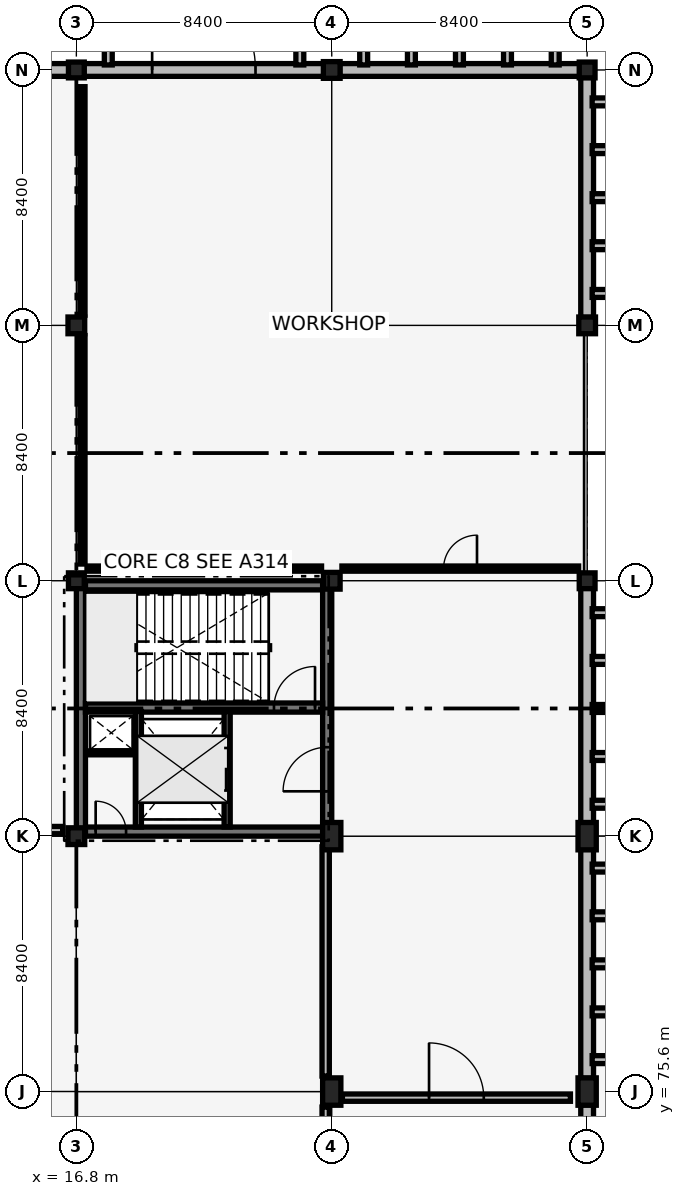
"""IFC4 building model, lengths in metres.
Left out: names, types, materials, properties, quantities, classifications, styles, units other than length and angle.
Written with IfcOpenShell. Run it as: python <this file> out.ifc"""

import sys

from ifc_helpers import new_model, si_unit, direction, frame, frame_2d, origin, origin_2d, place, context, subcontext, project, spatial, rectangle, extrude, element, fill, save


model = new_model("IFC4")
c1 = context("Model", 3, precision=1e-05, world=origin(), true_north=direction((0.0, 1.0)))
c2 = subcontext(c1, "Body", "Model", "MODEL_VIEW")
j1 = project(units=[si_unit("LENGTHUNIT", "METRE"), si_unit("PLANEANGLEUNIT", "RADIAN")], contexts=[c1])
p1 = place(None, origin())
s1 = spatial("IfcSite", under=j1, at=p1, CompositionType="ELEMENT")
p2 = place(p1, origin())
s2 = spatial("IfcBuilding", under=s1, at=p2, CompositionType="ELEMENT")
p3 = place(p2, origin())
s3 = spatial("IfcBuildingStorey", under=s2, at=p3, CompositionType="ELEMENT", Elevation=0.0)
p4 = place(p3, frame((16.95, 84.15, 0.0), z_axis=(0.0, 0.0, 1.0), x_axis=(1.0, 0.0, 0.0)))
e1 = element("IfcWall", 1, at=p4, inside=s3, PredefinedType="SHEAR", context=c2, shape_type="SweptSolid", body=[
    extrude(rectangle(XDim=8.1, YDim=0.3, at=frame_2d((4.05, 0.0))), origin(), (0.0, 0.0, 1.0), 5.14),
])
p5 = place(p4, frame((0.485, 0.0, 0.0)))
e2 = element("IfcOpeningElement", 2, at=p5, cuts=e1, PredefinedType="OPENING", context=c2, shape_type="SweptSolid", body=[
    extrude(rectangle(XDim=1.0, YDim=2.15, at=frame_2d((0.5, 1.075))), frame((0.0, 0.16, 0.0), z_axis=(0.0, -1.0, 0.0), x_axis=(1.0, 0.0, 0.0)), (0.0, 0.0, 1.0), 0.32),
])
for number, where, z_axis, x_axis in (
    (3, (16.95, 92.25, 0.0), (0.0, 0.0, 1.0), (1.0, 0.0, 0.0)),
    (4, (16.95, 84.15, 0.0), (0.0, 0.0, 1.0), (0.0, 1.0, 0.0)),
):
    element("IfcWall", number, at=place(p3, frame(where, z_axis=z_axis, x_axis=x_axis)), inside=s3, PredefinedType="SHEAR", context=c2, shape_type="SweptSolid", body=[
        extrude(rectangle(XDim=8.1, YDim=0.3, at=frame_2d((4.05, 0.0))), origin(), (0.0, 0.0, 1.0), 5.14),
    ])
p6 = place(p3, frame((25.05, 84.15, 0.0), z_axis=(0.0, 0.0, 1.0), x_axis=(0.0, 1.0, 0.0)))
e5 = element("IfcWall", 5, at=p6, inside=s3, PredefinedType="SHEAR", context=c2, shape_type="SweptSolid", body=[
    extrude(rectangle(XDim=8.1, YDim=0.3, at=frame_2d((4.05, 0.0))), origin(), (0.0, 0.0, 1.0), 5.14),
])
p7 = place(p6, frame((1.325, 0.0, 0.0)))
e6 = element("IfcOpeningElement", 6, at=p7, cuts=e5, PredefinedType="OPENING", context=c2, shape_type="SweptSolid", body=[
    extrude(rectangle(XDim=1.45, YDim=2.15, at=frame_2d((0.725, 1.075))), frame((0.0, 0.16, 0.0), z_axis=(0.0, -1.0, 0.0), x_axis=(1.0, 0.0, 0.0)), (0.0, 0.0, 1.0), 0.32),
])
p8 = place(p3, frame((17.1, 88.23, 0.0), z_axis=(0.0, 0.0, 1.0), x_axis=(1.0, 0.0, 0.0)))
e7 = element("IfcWall", 7, at=p8, inside=s3, PredefinedType="SHEAR", context=c2, shape_type="SweptSolid", body=[
    extrude(rectangle(XDim=7.8, YDim=0.3, at=frame_2d((3.9, 0.0))), origin(), (0.0, 0.0, 1.0), 5.14),
])
p9 = place(p8, frame((6.2, 0.0, 0.0)))
e8 = element("IfcOpeningElement", 8, at=p9, cuts=e7, PredefinedType="OPENING", context=c2, shape_type="SweptSolid", body=[
    extrude(rectangle(XDim=1.35, YDim=2.15, at=frame_2d((0.675, 1.075))), frame((0.0, 0.16, 0.0), z_axis=(0.0, -1.0, 0.0), x_axis=(1.0, 0.0, 0.0)), (0.0, 0.0, 1.0), 0.32),
])
p10 = place(p3, frame((16.8, 84.0, 0.0), z_axis=(0.0, 0.0, 1.0), x_axis=(1.0, 0.0, 0.0)))
e9 = element("IfcColumn", 9, at=p10, inside=s3, PredefinedType="COLUMN", context=c2, shape_type="SweptSolid", body=[
    extrude(rectangle(XDim=0.55, YDim=0.55, at=origin_2d()), origin(), (0.0, 0.0, 1.0), 5.14),
])
p11 = place(p3, frame((16.8, 92.4, 0.0), z_axis=(0.0, 0.0, 1.0), x_axis=(1.0, 0.0, 0.0)))
e10 = element("IfcColumn", 10, at=p11, inside=s3, PredefinedType="COLUMN", context=c2, shape_type="SweptSolid", body=[
    extrude(rectangle(XDim=0.52, YDim=0.52, at=origin_2d()), origin(), (0.0, 0.0, 1.0), 5.14),
])
p12 = place(p3, frame((16.8, 100.8, 0.0), z_axis=(0.0, 0.0, 1.0), x_axis=(1.0, 0.0, 0.0)))
e11 = element("IfcColumn", 11, at=p12, inside=s3, PredefinedType="COLUMN", context=c2, shape_type="SweptSolid", body=[
    extrude(rectangle(XDim=0.55, YDim=0.55, at=origin_2d()), origin(), (0.0, 0.0, 1.0), 5.14),
])
p13 = place(p3, frame((16.8, 109.2, 0.0), z_axis=(0.0, 0.0, 1.0), x_axis=(1.0, 0.0, 0.0)))
e12 = element("IfcColumn", 12, at=p13, inside=s3, PredefinedType="COLUMN", context=c2, shape_type="SweptSolid", body=[
    extrude(rectangle(XDim=0.52, YDim=0.52, at=origin_2d()), origin(), (0.0, 0.0, 1.0), 5.14),
])
for number, where, z_axis, x_axis in (
    (13, (25.2, 75.6, 0.0), (0.0, 0.0, 1.0), (1.0, 0.0, 0.0)),
    (14, (25.2, 84.0, 0.0), (0.0, 0.0, 1.0), (1.0, 0.0, 0.0)),
):
    element("IfcColumn", number, at=place(p3, frame(where, z_axis=z_axis, x_axis=x_axis)), inside=s3, PredefinedType="COLUMN", context=c2, shape_type="SweptSolid", body=[
        extrude(rectangle(XDim=0.6, YDim=0.9, at=origin_2d()), origin(), (0.0, 0.0, 1.0), 5.14),
    ])
p14 = place(p3, frame((25.2, 92.4, 0.0), z_axis=(0.0, 0.0, 1.0), x_axis=(1.0, 0.0, 0.0)))
e15 = element("IfcColumn", 15, at=p14, inside=s3, PredefinedType="COLUMN", context=c2, shape_type="SweptSolid", body=[
    extrude(rectangle(XDim=0.55, YDim=0.55, at=origin_2d()), origin(), (0.0, 0.0, 1.0), 5.14),
])
p15 = place(p3, frame((25.2, 100.8, 0.0), z_axis=(0.0, 0.0, 1.0), x_axis=(1.0, 0.0, 0.0)))
e16 = element("IfcColumn", 16, at=p15, inside=s3, PredefinedType="COLUMN", context=c2, shape_type="SweptSolid", body=[
    extrude(rectangle(XDim=0.5, YDim=0.5, at=origin_2d()), origin(), (0.0, 0.0, 1.0), 5.14),
])
p16 = place(p3, frame((25.2, 109.2, 0.0), z_axis=(0.0, 0.0, 1.0), x_axis=(1.0, 0.0, 0.0)))
e17 = element("IfcColumn", 17, at=p16, inside=s3, PredefinedType="COLUMN", context=c2, shape_type="SweptSolid", body=[
    extrude(rectangle(XDim=0.55, YDim=0.55, at=origin_2d()), origin(), (0.0, 0.0, 1.0), 5.14),
])
for number, where, z_axis, x_axis in (
    (18, (33.6, 75.6, 0.0), (0.0, 0.0, 1.0), (1.0, 0.0, 0.0)),
    (19, (33.6, 84.0, 0.0), (0.0, 0.0, 1.0), (1.0, 0.0, 0.0)),
):
    element("IfcColumn", number, at=place(p3, frame(where, z_axis=z_axis, x_axis=x_axis)), inside=s3, PredefinedType="COLUMN", context=c2, shape_type="SweptSolid", body=[
        extrude(rectangle(XDim=0.6, YDim=0.9, at=origin_2d()), origin(), (0.0, 0.0, 1.0), 5.14),
    ])
p17 = place(p3, frame((33.6, 92.4, 0.0), z_axis=(0.0, 0.0, 1.0), x_axis=(1.0, 0.0, 0.0)))
e20 = element("IfcColumn", 20, at=p17, inside=s3, PredefinedType="COLUMN", context=c2, shape_type="SweptSolid", body=[
    extrude(rectangle(XDim=0.52, YDim=0.52, at=origin_2d()), origin(), (0.0, 0.0, 1.0), 5.14),
])
p18 = place(p3, frame((33.6, 100.8, 0.0), z_axis=(0.0, 0.0, 1.0), x_axis=(1.0, 0.0, 0.0)))
e21 = element("IfcColumn", 21, at=p18, inside=s3, PredefinedType="COLUMN", context=c2, shape_type="SweptSolid", body=[
    extrude(rectangle(XDim=0.55, YDim=0.55, at=origin_2d()), origin(), (0.0, 0.0, 1.0), 5.14),
])
p19 = place(p3, frame((33.6, 109.2, 0.0), z_axis=(0.0, 0.0, 1.0), x_axis=(1.0, 0.0, 0.0)))
e22 = element("IfcColumn", 22, at=p19, inside=s3, PredefinedType="COLUMN", context=c2, shape_type="SweptSolid", body=[
    extrude(rectangle(XDim=0.52, YDim=0.52, at=origin_2d()), origin(), (0.0, 0.0, 1.0), 5.14),
])
p20 = place(p3, frame((8.66, 109.2, 0.0), z_axis=(0.0, 0.0, 1.0), x_axis=(1.0, 0.0, 0.0)))
e23 = element("IfcWall", 23, at=p20, inside=s3, PredefinedType="SOLIDWALL", context=c2, shape_type="SweptSolid", body=[
    extrude(rectangle(XDim=7.895, YDim=0.42, at=frame_2d((3.948, 0.0))), origin(), (0.0, 0.0, 1.0), 4.35),
])
p21 = place(p20, frame((2.248, 0.0, 0.0)))
e24 = element("IfcOpeningElement", 24, at=p21, cuts=e23, PredefinedType="OPENING", context=c2, shape_type="SweptSolid", body=[
    extrude(rectangle(XDim=3.4, YDim=3.8, at=frame_2d((1.7, 1.9))), frame((0.0, 0.22, 0.0), z_axis=(0.0, -1.0, 0.0), x_axis=(1.0, 0.0, 0.0)), (0.0, 0.0, 1.0), 0.44),
])
p22 = place(p3, frame((17.045, 109.2, 0.0), z_axis=(0.0, 0.0, 1.0), x_axis=(1.0, 0.0, 0.0)))
e25 = element("IfcWall", 25, at=p22, inside=s3, PredefinedType="SOLIDWALL", context=c2, shape_type="SweptSolid", body=[
    extrude(rectangle(XDim=7.895, YDim=0.42, at=frame_2d((3.948, 0.0))), origin(), (0.0, 0.0, 1.0), 4.35),
])
p23 = place(p22, frame((2.248, 0.0, 0.0)))
e26 = element("IfcOpeningElement", 26, at=p23, cuts=e25, PredefinedType="OPENING", context=c2, shape_type="SweptSolid", body=[
    extrude(rectangle(XDim=3.4, YDim=3.8, at=frame_2d((1.7, 1.9))), frame((0.0, 0.22, 0.0), z_axis=(0.0, -1.0, 0.0), x_axis=(1.0, 0.0, 0.0)), (0.0, 0.0, 1.0), 0.44),
])
for number, where, z_axis, x_axis in (
    (27, (17.85, 109.365, -0.25), (0.0, 0.0, 1.0), (0.0, 1.0, 0.0)),
    (28, (24.15, 109.365, -0.25), (0.0, 0.0, 1.0), (0.0, 1.0, 0.0)),
):
    element("IfcWall", number, at=place(p3, frame(where, z_axis=z_axis, x_axis=x_axis)), inside=s3, PredefinedType="SOLIDWALL", context=c2, shape_type="SweptSolid", body=[
        extrude(rectangle(XDim=0.7, YDim=0.26, at=frame_2d((0.35, 0.0))), origin(), (0.0, 0.0, 1.0), 5.69),
    ])
p24 = place(p3, frame((33.6, 67.635, 0.0), z_axis=(0.0, 0.0, 1.0), x_axis=(0.0, 1.0, 0.0)))
e29 = element("IfcWall", 29, at=p24, inside=s3, PredefinedType="SOLIDWALL", context=c2, shape_type="SweptSolid", body=[
    extrude(rectangle(XDim=7.53, YDim=0.42, at=frame_2d((3.765, 0.0))), origin(), (0.0, 0.0, 1.0), 4.35),
])
p25 = place(p24, frame((2.665, 0.0, 0.0)))
e30 = element("IfcOpeningElement", 30, at=p25, cuts=e29, PredefinedType="OPENING", context=c2, shape_type="SweptSolid", body=[
    extrude(rectangle(XDim=2.2, YDim=2.4, at=frame_2d((1.1, 1.2))), frame((0.0, 0.22, 0.0), z_axis=(0.0, -1.0, 0.0), x_axis=(1.0, 0.0, 0.0)), (0.0, 0.0, 1.0), 0.44),
])
p26 = place(p3, frame((33.6, 76.035, 0.0), z_axis=(0.0, 0.0, 1.0), x_axis=(0.0, 1.0, 0.0)))
e31 = element("IfcWall", 31, at=p26, inside=s3, PredefinedType="SOLIDWALL", context=c2, shape_type="SweptSolid", body=[
    extrude(rectangle(XDim=7.53, YDim=0.42, at=frame_2d((3.765, 0.0))), origin(), (0.0, 0.0, 1.0), 4.35),
])
for number, where, z_axis, x_axis in (
    (32, (33.765, 76.65, -0.25), (0.0, 0.0, 1.0), (1.0, 0.0, 0.0)),
    (33, (33.765, 78.22, -0.25), (0.0, 0.0, 1.0), (1.0, 0.0, 0.0)),
    (34, (33.765, 79.8, -0.25), (0.0, 0.0, 1.0), (1.0, 0.0, 0.0)),
    (35, (33.765, 81.38, -0.25), (0.0, 0.0, 1.0), (1.0, 0.0, 0.0)),
    (36, (33.765, 82.95, -0.25), (0.0, 0.0, 1.0), (1.0, 0.0, 0.0)),
):
    element("IfcWall", number, at=place(p3, frame(where, z_axis=z_axis, x_axis=x_axis)), inside=s3, PredefinedType="SOLIDWALL", context=c2, shape_type="SweptSolid", body=[
        extrude(rectangle(XDim=0.7, YDim=0.26, at=frame_2d((0.35, 0.0))), origin(), (0.0, 0.0, 1.0), 5.69),
    ])
p27 = place(p3, frame((33.6, 84.435, 0.0), z_axis=(0.0, 0.0, 1.0), x_axis=(0.0, 1.0, 0.0)))
e37 = element("IfcWall", 37, at=p27, inside=s3, PredefinedType="SOLIDWALL", context=c2, shape_type="SweptSolid", body=[
    extrude(rectangle(XDim=7.72, YDim=0.42, at=frame_2d((3.86, 0.0))), origin(), (0.0, 0.0, 1.0), 4.35),
])
for number, where, z_axis, x_axis in (
    (38, (33.765, 85.05, -0.25), (0.0, 0.0, 1.0), (1.0, 0.0, 0.0)),
    (39, (33.765, 86.62, -0.25), (0.0, 0.0, 1.0), (1.0, 0.0, 0.0)),
    (40, (33.765, 88.2, -0.25), (0.0, 0.0, 1.0), (1.0, 0.0, 0.0)),
    (41, (33.765, 89.78, -0.25), (0.0, 0.0, 1.0), (1.0, 0.0, 0.0)),
    (42, (33.765, 91.35, -0.25), (0.0, 0.0, 1.0), (1.0, 0.0, 0.0)),
):
    element("IfcWall", number, at=place(p3, frame(where, z_axis=z_axis, x_axis=x_axis)), inside=s3, PredefinedType="SOLIDWALL", context=c2, shape_type="SweptSolid", body=[
        extrude(rectangle(XDim=0.7, YDim=0.26, at=frame_2d((0.35, 0.0))), origin(), (0.0, 0.0, 1.0), 5.69),
    ])
p28 = place(p3, frame((25.46, 109.2, 0.0), z_axis=(0.0, 0.0, 1.0), x_axis=(1.0, 0.0, 0.0)))
e43 = element("IfcWall", 43, at=p28, inside=s3, PredefinedType="SOLIDWALL", context=c2, shape_type="SweptSolid", body=[
    extrude(rectangle(XDim=7.895, YDim=0.42, at=frame_2d((3.948, 0.0))), origin(), (0.0, 0.0, 1.0), 4.35),
])
for number, where, z_axis, x_axis in (
    (44, (26.25, 109.365, -0.25), (0.0, 0.0, 1.0), (0.0, 1.0, 0.0)),
    (45, (27.82, 109.365, -0.25), (0.0, 0.0, 1.0), (0.0, 1.0, 0.0)),
    (46, (29.4, 109.365, -0.25), (0.0, 0.0, 1.0), (0.0, 1.0, 0.0)),
    (47, (30.98, 109.365, -0.25), (0.0, 0.0, 1.0), (0.0, 1.0, 0.0)),
    (48, (32.55, 109.365, -0.25), (0.0, 0.0, 1.0), (0.0, 1.0, 0.0)),
):
    element("IfcWall", number, at=place(p3, frame(where, z_axis=z_axis, x_axis=x_axis)), inside=s3, PredefinedType="SOLIDWALL", context=c2, shape_type="SweptSolid", body=[
        extrude(rectangle(XDim=0.7, YDim=0.26, at=frame_2d((0.35, 0.0))), origin(), (0.0, 0.0, 1.0), 5.69),
    ])
p29 = place(p3, frame((33.6, 101.06, 0.0), z_axis=(0.0, 0.0, 1.0), x_axis=(0.0, 1.0, 0.0)))
e49 = element("IfcWall", 49, at=p29, inside=s3, PredefinedType="SOLIDWALL", context=c2, shape_type="SweptSolid", body=[
    extrude(rectangle(XDim=7.895, YDim=0.42, at=frame_2d((3.948, 0.0))), origin(), (0.0, 0.0, 1.0), 4.35),
])
for number, where, z_axis, x_axis in (
    (50, (33.765, 101.85, -0.25), (0.0, 0.0, 1.0), (1.0, 0.0, 0.0)),
    (51, (33.765, 103.42, -0.25), (0.0, 0.0, 1.0), (1.0, 0.0, 0.0)),
    (52, (33.765, 105.0, -0.25), (0.0, 0.0, 1.0), (1.0, 0.0, 0.0)),
    (53, (33.765, 106.58, -0.25), (0.0, 0.0, 1.0), (1.0, 0.0, 0.0)),
    (54, (33.765, 108.15, -0.25), (0.0, 0.0, 1.0), (1.0, 0.0, 0.0)),
):
    element("IfcWall", number, at=place(p3, frame(where, z_axis=z_axis, x_axis=x_axis)), inside=s3, PredefinedType="SOLIDWALL", context=c2, shape_type="SweptSolid", body=[
        extrude(rectangle(XDim=0.7, YDim=0.26, at=frame_2d((0.35, 0.0))), origin(), (0.0, 0.0, 1.0), 5.69),
    ])
p30 = place(p3, frame((21.76, 84.3, 0.0), z_axis=(0.0, 0.0, 1.0), x_axis=(0.0, 1.0, 0.0)))
e55 = element("IfcWall", 55, at=p30, inside=s3, PredefinedType="SHEAR", context=c2, shape_type="SweptSolid", body=[
    extrude(rectangle(XDim=3.8, YDim=0.2, at=frame_2d((1.9, 0.0))), origin(), (0.0, 0.0, 1.0), 4.36),
])
p31 = place(p30, frame((1.2, 0.0, 0.0)))
e56 = element("IfcOpeningElement", 56, at=p31, cuts=e55, PredefinedType="OPENING", context=c2, shape_type="SweptSolid", body=[
    extrude(rectangle(XDim=1.4, YDim=2.2, at=frame_2d((0.7, 1.1))), frame((0.0, 0.11, 0.0), z_axis=(0.0, -1.0, 0.0), x_axis=(1.0, 0.0, 0.0)), (0.0, 0.0, 1.0), 0.22),
])
p32 = place(p3, frame((18.84, 84.3, 0.0), z_axis=(0.0, 0.0, 1.0), x_axis=(0.0, 1.0, 0.0)))
e57 = element("IfcWall", 57, at=p32, inside=s3, PredefinedType="SHEAR", context=c2, shape_type="SweptSolid", body=[
    extrude(rectangle(XDim=3.8, YDim=0.2, at=frame_2d((1.9, 0.0))), origin(), (0.0, 0.0, 1.0), 4.36),
])
p33 = place(p3, frame((17.12, 86.74, 0.0), z_axis=(0.0, 0.0, 1.0), x_axis=(1.0, 0.0, 0.0)))
e58 = element("IfcWall", 58, at=p33, inside=s3, PredefinedType="PARTITIONING", context=c2, shape_type="SweptSolid", body=[
    extrude(rectangle(XDim=1.62, YDim=0.13, at=frame_2d((0.81, 0.0))), origin(), (0.0, 0.0, 1.0), 5.14),
])
p34 = place(p3, frame((25.0, 67.71, 0.0), z_axis=(0.0, 0.0, 1.0), x_axis=(0.0, 1.0, 0.0)))
e59 = element("IfcWall", 59, at=p34, inside=s3, PredefinedType="PARTITIONING", context=c2, shape_type="SweptSolid", body=[
    extrude(rectangle(XDim=7.38, YDim=0.24, at=frame_2d((3.69, 0.0))), origin(), (0.0, 0.0, 1.0), 4.35),
])
p35 = place(p3, frame((25.0, 76.11, 0.0), z_axis=(0.0, 0.0, 1.0), x_axis=(0.0, 1.0, 0.0)))
e60 = element("IfcWall", 60, at=p35, inside=s3, PredefinedType="PARTITIONING", context=c2, shape_type="SweptSolid", body=[
    extrude(rectangle(XDim=7.54, YDim=0.24, at=frame_2d((3.77, 0.0))), origin(), (0.0, 0.0, 1.0), 4.35),
])
p36 = place(p3, frame((25.55, 75.4, 0.0), z_axis=(0.0, 0.0, 1.0), x_axis=(1.0, 0.0, 0.0)))
e61 = element("IfcWall", 61, at=p36, inside=s3, PredefinedType="PARTITIONING", context=c2, shape_type="SweptSolid", body=[
    extrude(rectangle(XDim=7.5, YDim=0.24, at=frame_2d((3.75, 0.0))), origin(), (0.0, 0.0, 1.0), 4.42),
])
p37 = place(p36, frame((2.85, 0.0, 0.0)))
e62 = element("IfcOpeningElement", 62, at=p37, cuts=e61, PredefinedType="OPENING", context=c2, shape_type="SweptSolid", body=[
    extrude(rectangle(XDim=1.8, YDim=2.4, at=frame_2d((0.9, 1.2))), frame((0.0, 0.13, 0.0), z_axis=(0.0, -1.0, 0.0), x_axis=(1.0, 0.0, 0.0)), (0.0, 0.0, 1.0), 0.26),
])
p38 = place(p3, frame((8.71, 84.2, 0.0), z_axis=(0.0, 0.0, 1.0), x_axis=(1.0, 0.0, 0.0)))
e63 = element("IfcWall", 63, at=p38, inside=s3, PredefinedType="PARTITIONING", context=c2, shape_type="SweptSolid", body=[
    extrude(rectangle(XDim=7.64, YDim=0.24, at=frame_2d((3.82, 0.0))), origin(), (0.0, 0.0, 1.0), 4.36),
])
p39 = place(p3, frame((17.15, 92.8, 0.0), z_axis=(0.0, 0.0, 1.0), x_axis=(1.0, 0.0, 0.0)))
e64 = element("IfcWall", 64, at=p39, inside=s3, PredefinedType="PARTITIONING", context=c2, shape_type="SweptSolid", body=[
    extrude(rectangle(XDim=7.715, YDim=0.17, at=frame_2d((3.857, 0.0))), origin(), (0.0, 0.0, 1.0), 5.14),
])
p40 = place(p3, frame((25.535, 92.8, 0.0), z_axis=(0.0, 0.0, 1.0), x_axis=(1.0, 0.0, 0.0)))
e65 = element("IfcWall", 65, at=p40, inside=s3, PredefinedType="PARTITIONING", context=c2, shape_type="SweptSolid", body=[
    extrude(rectangle(XDim=7.785, YDim=0.17, at=frame_2d((3.893, 0.0))), origin(), (0.0, 0.0, 1.0), 4.35),
])
p41 = place(p40, frame((3.343, 0.0, 0.0)))
e66 = element("IfcOpeningElement", 66, at=p41, cuts=e65, PredefinedType="OPENING", context=c2, shape_type="SweptSolid", body=[
    extrude(rectangle(XDim=1.1, YDim=2.15, at=frame_2d((0.55, 1.075))), frame((0.0, 0.095, 0.0), z_axis=(0.0, -1.0, 0.0), x_axis=(1.0, 0.0, 0.0)), (0.0, 0.0, 1.0), 0.19),
])
p42 = place(p3, frame((17.0, 92.95, 0.0), z_axis=(0.0, 0.0, 1.0), x_axis=(0.0, 1.0, 0.0)))
e67 = element("IfcWall", 67, at=p42, inside=s3, PredefinedType="PARTITIONING", context=c2, shape_type="SweptSolid", body=[
    extrude(rectangle(XDim=7.515, YDim=0.17, at=frame_2d((3.758, 0.0))), origin(), (0.0, 0.0, 1.0), 4.32),
])
p43 = place(p3, frame((17.0, 101.135, 0.0), z_axis=(0.0, 0.0, 1.0), x_axis=(0.0, 1.0, 0.0)))
e68 = element("IfcWall", 68, at=p43, inside=s3, PredefinedType="PARTITIONING", context=c2, shape_type="SweptSolid", body=[
    extrude(rectangle(XDim=7.515, YDim=0.17, at=frame_2d((3.757, 0.0))), origin(), (0.0, 0.0, 1.0), 4.32),
])
p44 = place(p23, origin())
e69 = element("IfcDoor", 69, at=p44, inside=s3, OperationType="DOUBLE_DOOR_SINGLE_SWING", PredefinedType="GATE", context=c2, shape_type="SweptSolid", body=[
    extrude(rectangle(XDim=3.4, YDim=3.8, at=frame_2d((1.7, 1.9))), frame((0.0, 0.025, 0.0), z_axis=(0.0, -1.0, 0.0), x_axis=(1.0, 0.0, 0.0)), (0.0, 0.0, 1.0), 0.05),
])
fill(e26, e69)
p45 = place(p9, origin())
e70 = element("IfcDoor", 70, at=p45, inside=s3, OperationType="SINGLE_SWING_RIGHT", PredefinedType="DOOR", context=c2, shape_type="SweptSolid", body=[
    extrude(rectangle(XDim=1.35, YDim=2.15, at=frame_2d((0.675, 1.075))), frame((0.0, 0.025, 0.0), z_axis=(0.0, -1.0, 0.0), x_axis=(1.0, 0.0, 0.0)), (0.0, 0.0, 1.0), 0.05),
])
fill(e8, e70)
p46 = place(p31, origin())
e71 = element("IfcDoor", 71, at=p46, inside=s3, OperationType="SLIDING_TO_LEFT", PredefinedType="DOOR", context=c2, shape_type="SweptSolid", body=[
    extrude(rectangle(XDim=1.4, YDim=2.2, at=frame_2d((0.7, 1.1))), frame((0.0, 0.025, 0.0), z_axis=(0.0, -1.0, 0.0), x_axis=(1.0, 0.0, 0.0)), (0.0, 0.0, 1.0), 0.05),
])
fill(e56, e71)
p47 = place(p7, origin())
e72 = element("IfcDoor", 72, at=p47, inside=s3, OperationType="DOUBLE_DOOR_SINGLE_SWING", PredefinedType="DOOR", context=c2, shape_type="SweptSolid", body=[
    extrude(rectangle(XDim=1.45, YDim=2.15, at=frame_2d((0.725, 1.075))), frame((0.0, 0.025, 0.0), z_axis=(0.0, -1.0, 0.0), x_axis=(1.0, 0.0, 0.0)), (0.0, 0.0, 1.0), 0.05),
])
fill(e6, e72)
p48 = place(p5, origin())
e73 = element("IfcDoor", 73, at=p48, inside=s3, OperationType="SINGLE_SWING_LEFT", PredefinedType="DOOR", context=c2, shape_type="SweptSolid", body=[
    extrude(rectangle(XDim=1.0, YDim=2.15, at=frame_2d((0.5, 1.075))), frame((0.0, 0.025, 0.0), z_axis=(0.0, -1.0, 0.0), x_axis=(1.0, 0.0, 0.0)), (0.0, 0.0, 1.0), 0.05),
])
fill(e2, e73)
p49 = place(p37, origin())
e74 = element("IfcDoor", 74, at=p49, inside=s3, OperationType="DOUBLE_DOOR_SINGLE_SWING", PredefinedType="DOOR", context=c2, shape_type="SweptSolid", body=[
    extrude(rectangle(XDim=1.8, YDim=2.4, at=frame_2d((0.9, 1.2))), frame((0.0, 0.025, 0.0), z_axis=(0.0, -1.0, 0.0), x_axis=(1.0, 0.0, 0.0)), (0.0, 0.0, 1.0), 0.05),
])
fill(e62, e74)
p50 = place(p41, origin())
e75 = element("IfcDoor", 75, at=p50, inside=s3, OperationType="SINGLE_SWING_RIGHT", PredefinedType="DOOR", context=c2, shape_type="SweptSolid", body=[
    extrude(rectangle(XDim=1.1, YDim=2.15, at=frame_2d((0.55, 1.075))), frame((0.0, 0.025, 0.0), z_axis=(0.0, -1.0, 0.0), x_axis=(1.0, 0.0, 0.0)), (0.0, 0.0, 1.0), 0.05),
])
fill(e66, e75)
save(model, sys.argv[1])
